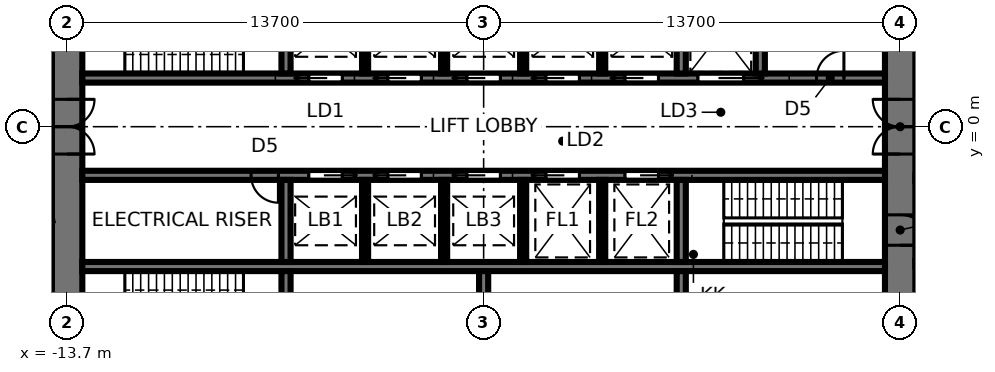
"""IFC4 building model, lengths in metres.
Left out: names, types, materials, properties, quantities, classifications, styles, units other than length and angle.
Written with IfcOpenShell. Run it as: python <this file> out.ifc"""

import sys

from ifc_helpers import new_model, si_unit, direction, frame, frame_2d, origin, place, context, subcontext, project, spatial, rectangle, extrude, element, fill, save


model = new_model("IFC4")
c1 = context("Model", 3, precision=1e-05, world=origin(), true_north=direction((0.0, 1.0)))
c2 = subcontext(c1, "Body", "Model", "MODEL_VIEW")
j1 = project(units=[si_unit("LENGTHUNIT", "METRE"), si_unit("PLANEANGLEUNIT", "RADIAN")], contexts=[c1])
p1 = place(None, origin())
s1 = spatial("IfcSite", under=j1, at=p1, CompositionType="ELEMENT")
p2 = place(p1, origin())
s2 = spatial("IfcBuilding", under=s1, at=p2, CompositionType="ELEMENT")
p3 = place(p2, origin())
s3 = spatial("IfcBuildingStorey", under=s2, at=p3, CompositionType="ELEMENT", Elevation=0.0)
p4 = place(p3, frame((13.7, -9.5, 0.0), z_axis=(0.0, 0.0, 1.0), x_axis=(0.0, 1.0, 0.0)))
e1 = element("IfcWall", 1, at=p4, inside=s3, PredefinedType="SHEAR", context=c2, shape_type="SweptSolid", body=[
    extrude(rectangle(XDim=19.0, YDim=1.0, at=frame_2d((9.5, 0.0))), origin(), (0.0, 0.0, 1.0), 5.6),
])
p5 = place(p4, frame((8.6, 0.0, 0.0)))
e2 = element("IfcOpeningElement", 2, at=p5, cuts=e1, PredefinedType="OPENING", context=c2, shape_type="SweptSolid", body=[
    extrude(rectangle(XDim=1.8, YDim=2.4, at=frame_2d((0.9, 1.2))), frame((0.0, 0.51, 0.0), z_axis=(0.0, -1.0, 0.0), x_axis=(1.0, 0.0, 0.0)), (0.0, 0.0, 1.0), 1.02),
])
p6 = place(p4, frame((5.6, 0.0, 0.0)))
e3 = element("IfcOpeningElement", 3, at=p6, cuts=e1, PredefinedType="OPENING", context=c2, shape_type="SweptSolid", body=[
    extrude(rectangle(XDim=1.0, YDim=2.1, at=frame_2d((0.5, 1.05))), frame((0.0, 0.51, 0.0), z_axis=(0.0, -1.0, 0.0), x_axis=(1.0, 0.0, 0.0)), (0.0, 0.0, 1.0), 1.02),
])
p7 = place(p3, frame((-13.7, 9.5, 0.0), z_axis=(0.0, 0.0, 1.0), x_axis=(0.0, -1.0, 0.0)))
e4 = element("IfcWall", 4, at=p7, inside=s3, PredefinedType="SHEAR", context=c2, shape_type="SweptSolid", body=[
    extrude(rectangle(XDim=19.0, YDim=1.0, at=frame_2d((9.5, 0.0))), origin(), (0.0, 0.0, 1.0), 5.6),
])
p8 = place(p7, frame((8.6, 0.0, 0.0)))
e5 = element("IfcOpeningElement", 5, at=p8, cuts=e4, PredefinedType="OPENING", context=c2, shape_type="SweptSolid", body=[
    extrude(rectangle(XDim=1.8, YDim=2.4, at=frame_2d((0.9, 1.2))), frame((0.0, 0.51, 0.0), z_axis=(0.0, -1.0, 0.0), x_axis=(1.0, 0.0, 0.0)), (0.0, 0.0, 1.0), 1.02),
])
p9 = place(p7, frame((5.3, 0.0, 0.0)))
e6 = element("IfcOpeningElement", 6, at=p9, cuts=e4, PredefinedType="OPENING", context=c2, shape_type="SweptSolid", body=[
    extrude(rectangle(XDim=1.0, YDim=2.1, at=frame_2d((0.5, 1.05))), frame((0.0, 0.51, 0.0), z_axis=(0.0, -1.0, 0.0), x_axis=(1.0, 0.0, 0.0)), (0.0, 0.0, 1.0), 1.02),
])
p10 = place(p3, frame((-13.2, 1.6, 0.0), z_axis=(0.0, 0.0, 1.0), x_axis=(1.0, 0.0, 0.0)))
e7 = element("IfcWall", 7, at=p10, inside=s3, PredefinedType="SHEAR", context=c2, shape_type="SweptSolid", body=[
    extrude(rectangle(XDim=26.4, YDim=0.3, at=frame_2d((13.2, 0.0))), origin(), (0.0, 0.0, 1.0), 5.6),
])
p11 = place(p10, frame((20.25, 0.0, 0.0)))
e8 = element("IfcOpeningElement", 8, at=p11, cuts=e7, PredefinedType="OPENING", context=c2, shape_type="SweptSolid", body=[
    extrude(rectangle(XDim=1.5, YDim=2.4, at=frame_2d((0.75, 1.2))), frame((0.0, 0.16, 0.0), z_axis=(0.0, -1.0, 0.0), x_axis=(1.0, 0.0, 0.0)), (0.0, 0.0, 1.0), 0.32),
])
p12 = place(p10, frame((7.45, 0.0, 0.0)))
e9 = element("IfcOpeningElement", 9, at=p12, cuts=e7, PredefinedType="OPENING", context=c2, shape_type="SweptSolid", body=[
    extrude(rectangle(XDim=1.1, YDim=2.3, at=frame_2d((0.55, 1.15))), frame((0.0, 0.16, 0.0), z_axis=(0.0, -1.0, 0.0), x_axis=(1.0, 0.0, 0.0)), (0.0, 0.0, 1.0), 0.32),
])
p13 = place(p10, frame((10.05, 0.0, 0.0)))
e10 = element("IfcOpeningElement", 10, at=p13, cuts=e7, PredefinedType="OPENING", context=c2, shape_type="SweptSolid", body=[
    extrude(rectangle(XDim=1.1, YDim=2.3, at=frame_2d((0.55, 1.15))), frame((0.0, 0.16, 0.0), z_axis=(0.0, -1.0, 0.0), x_axis=(1.0, 0.0, 0.0)), (0.0, 0.0, 1.0), 0.32),
])
p14 = place(p10, frame((12.65, 0.0, 0.0)))
e11 = element("IfcOpeningElement", 11, at=p14, cuts=e7, PredefinedType="OPENING", context=c2, shape_type="SweptSolid", body=[
    extrude(rectangle(XDim=1.1, YDim=2.3, at=frame_2d((0.55, 1.15))), frame((0.0, 0.16, 0.0), z_axis=(0.0, -1.0, 0.0), x_axis=(1.0, 0.0, 0.0)), (0.0, 0.0, 1.0), 0.32),
])
p15 = place(p10, frame((15.25, 0.0, 0.0)))
e12 = element("IfcOpeningElement", 12, at=p15, cuts=e7, PredefinedType="OPENING", context=c2, shape_type="SweptSolid", body=[
    extrude(rectangle(XDim=1.1, YDim=2.3, at=frame_2d((0.55, 1.15))), frame((0.0, 0.16, 0.0), z_axis=(0.0, -1.0, 0.0), x_axis=(1.0, 0.0, 0.0)), (0.0, 0.0, 1.0), 0.32),
])
p16 = place(p10, frame((17.85, 0.0, 0.0)))
e13 = element("IfcOpeningElement", 13, at=p16, cuts=e7, PredefinedType="OPENING", context=c2, shape_type="SweptSolid", body=[
    extrude(rectangle(XDim=1.1, YDim=2.3, at=frame_2d((0.55, 1.15))), frame((0.0, 0.16, 0.0), z_axis=(0.0, -1.0, 0.0), x_axis=(1.0, 0.0, 0.0)), (0.0, 0.0, 1.0), 0.32),
])
p17 = place(p10, frame((24.15, 0.0, 0.0)))
e14 = element("IfcOpeningElement", 14, at=p17, cuts=e7, PredefinedType="OPENING", context=c2, shape_type="SweptSolid", body=[
    extrude(rectangle(XDim=0.9, YDim=2.1, at=frame_2d((0.45, 1.05))), frame((0.0, 0.16, 0.0), z_axis=(0.0, -1.0, 0.0), x_axis=(1.0, 0.0, 0.0)), (0.0, 0.0, 1.0), 0.32),
])
p18 = place(p3, frame((-13.2, -1.6, 0.0), z_axis=(0.0, 0.0, 1.0), x_axis=(1.0, 0.0, 0.0)))
e15 = element("IfcWall", 15, at=p18, inside=s3, PredefinedType="SHEAR", context=c2, shape_type="SweptSolid", body=[
    extrude(rectangle(XDim=26.4, YDim=0.3, at=frame_2d((13.2, 0.0))), origin(), (0.0, 0.0, 1.0), 5.6),
])
p19 = place(p18, frame((7.45, 0.0, 0.0)))
e16 = element("IfcOpeningElement", 16, at=p19, cuts=e15, PredefinedType="OPENING", context=c2, shape_type="SweptSolid", body=[
    extrude(rectangle(XDim=1.1, YDim=2.3, at=frame_2d((0.55, 1.15))), frame((0.0, 0.16, 0.0), z_axis=(0.0, -1.0, 0.0), x_axis=(1.0, 0.0, 0.0)), (0.0, 0.0, 1.0), 0.32),
])
p20 = place(p18, frame((10.05, 0.0, 0.0)))
e17 = element("IfcOpeningElement", 17, at=p20, cuts=e15, PredefinedType="OPENING", context=c2, shape_type="SweptSolid", body=[
    extrude(rectangle(XDim=1.1, YDim=2.3, at=frame_2d((0.55, 1.15))), frame((0.0, 0.16, 0.0), z_axis=(0.0, -1.0, 0.0), x_axis=(1.0, 0.0, 0.0)), (0.0, 0.0, 1.0), 0.32),
])
p21 = place(p18, frame((12.65, 0.0, 0.0)))
e18 = element("IfcOpeningElement", 18, at=p21, cuts=e15, PredefinedType="OPENING", context=c2, shape_type="SweptSolid", body=[
    extrude(rectangle(XDim=1.1, YDim=2.3, at=frame_2d((0.55, 1.15))), frame((0.0, 0.16, 0.0), z_axis=(0.0, -1.0, 0.0), x_axis=(1.0, 0.0, 0.0)), (0.0, 0.0, 1.0), 0.32),
])
p22 = place(p18, frame((15.25, 0.0, 0.0)))
e19 = element("IfcOpeningElement", 19, at=p22, cuts=e15, PredefinedType="OPENING", context=c2, shape_type="SweptSolid", body=[
    extrude(rectangle(XDim=1.1, YDim=2.3, at=frame_2d((0.55, 1.15))), frame((0.0, 0.16, 0.0), z_axis=(0.0, -1.0, 0.0), x_axis=(1.0, 0.0, 0.0)), (0.0, 0.0, 1.0), 0.32),
])
p23 = place(p18, frame((17.85, 0.0, 0.0)))
e20 = element("IfcOpeningElement", 20, at=p23, cuts=e15, PredefinedType="OPENING", context=c2, shape_type="SweptSolid", body=[
    extrude(rectangle(XDim=1.1, YDim=2.3, at=frame_2d((0.55, 1.15))), frame((0.0, 0.16, 0.0), z_axis=(0.0, -1.0, 0.0), x_axis=(1.0, 0.0, 0.0)), (0.0, 0.0, 1.0), 0.32),
])
p24 = place(p18, frame((5.55, 0.0, 0.0)))
e21 = element("IfcOpeningElement", 21, at=p24, cuts=e15, PredefinedType="OPENING", context=c2, shape_type="SweptSolid", body=[
    extrude(rectangle(XDim=0.9, YDim=2.1, at=frame_2d((0.45, 1.05))), frame((0.0, 0.16, 0.0), z_axis=(0.0, -1.0, 0.0), x_axis=(1.0, 0.0, 0.0)), (0.0, 0.0, 1.0), 0.32),
])
p25 = place(p3, frame((-13.2, -4.6, 0.0), z_axis=(0.0, 0.0, 1.0), x_axis=(1.0, 0.0, 0.0)))
e22 = element("IfcWall", 22, at=p25, inside=s3, PredefinedType="SHEAR", context=c2, shape_type="SweptSolid", body=[
    extrude(rectangle(XDim=26.4, YDim=0.3, at=frame_2d((13.2, 0.0))), origin(), (0.0, 0.0, 1.0), 5.6),
])
for number, where, z_axis, x_axis in (
    (23, (-6.5, 1.75, 0.0), (0.0, 0.0, 1.0), (0.0, 1.0, 0.0)),
    (24, (6.5, 1.75, 0.0), (0.0, 0.0, 1.0), (0.0, 1.0, 0.0)),
):
    element("IfcWall", number, at=place(p3, frame(where, z_axis=z_axis, x_axis=x_axis)), inside=s3, PredefinedType="SHEAR", context=c2, shape_type="SweptSolid", body=[
        extrude(rectangle(XDim=2.7, YDim=0.3, at=frame_2d((1.35, 0.0))), origin(), (0.0, 0.0, 1.0), 5.6),
    ])
for number, where, z_axis, x_axis in (
    (25, (-3.9, 1.75, 0.0), (0.0, 0.0, 1.0), (0.0, 1.0, 0.0)),
    (26, (-1.3, 1.75, 0.0), (0.0, 0.0, 1.0), (0.0, 1.0, 0.0)),
    (27, (1.3, 1.75, 0.0), (0.0, 0.0, 1.0), (0.0, 1.0, 0.0)),
    (28, (3.9, 1.75, 0.0), (0.0, 0.0, 1.0), (0.0, 1.0, 0.0)),
):
    element("IfcWall", number, at=place(p3, frame(where, z_axis=z_axis, x_axis=x_axis)), inside=s3, PredefinedType="SHEAR", context=c2, shape_type="SweptSolid", body=[
        extrude(rectangle(XDim=2.7, YDim=0.2, at=frame_2d((1.35, 0.0))), origin(), (0.0, 0.0, 1.0), 5.6),
    ])
p26 = place(p3, frame((-6.5, -1.75, 0.0), z_axis=(0.0, 0.0, 1.0), x_axis=(0.0, -1.0, 0.0)))
e29 = element("IfcWall", 29, at=p26, inside=s3, PredefinedType="SHEAR", context=c2, shape_type="SweptSolid", body=[
    extrude(rectangle(XDim=2.7, YDim=0.3, at=frame_2d((1.35, 0.0))), origin(), (0.0, 0.0, 1.0), 5.6),
])
p27 = place(p3, frame((-6.5, -4.75, 0.0), z_axis=(0.0, 0.0, 1.0), x_axis=(0.0, -1.0, 0.0)))
e30 = element("IfcWall", 30, at=p27, inside=s3, PredefinedType="SHEAR", context=c2, shape_type="SweptSolid", body=[
    extrude(rectangle(XDim=3.75, YDim=0.3, at=frame_2d((1.875, 0.0))), origin(), (0.0, 0.0, 1.0), 5.6),
])
p28 = place(p3, frame((6.5, -1.75, 0.0), z_axis=(0.0, 0.0, 1.0), x_axis=(0.0, -1.0, 0.0)))
e31 = element("IfcWall", 31, at=p28, inside=s3, PredefinedType="SHEAR", context=c2, shape_type="SweptSolid", body=[
    extrude(rectangle(XDim=2.7, YDim=0.3, at=frame_2d((1.35, 0.0))), origin(), (0.0, 0.0, 1.0), 5.6),
])
p29 = place(p3, frame((6.5, -4.75, 0.0), z_axis=(0.0, 0.0, 1.0), x_axis=(0.0, -1.0, 0.0)))
e32 = element("IfcWall", 32, at=p29, inside=s3, PredefinedType="SHEAR", context=c2, shape_type="SweptSolid", body=[
    extrude(rectangle(XDim=3.75, YDim=0.3, at=frame_2d((1.875, 0.0))), origin(), (0.0, 0.0, 1.0), 5.6),
])
for number, where, z_axis, x_axis in (
    (33, (-3.9, -1.75, 0.0), (0.0, 0.0, 1.0), (0.0, -1.0, 0.0)),
    (34, (-1.3, -1.75, 0.0), (0.0, 0.0, 1.0), (0.0, -1.0, 0.0)),
    (35, (1.3, -1.75, 0.0), (0.0, 0.0, 1.0), (0.0, -1.0, 0.0)),
    (36, (3.9, -1.75, 0.0), (0.0, 0.0, 1.0), (0.0, -1.0, 0.0)),
):
    element("IfcWall", number, at=place(p3, frame(where, z_axis=z_axis, x_axis=x_axis)), inside=s3, PredefinedType="SHEAR", context=c2, shape_type="SweptSolid", body=[
        extrude(rectangle(XDim=2.7, YDim=0.2, at=frame_2d((1.35, 0.0))), origin(), (0.0, 0.0, 1.0), 5.6),
    ])
p30 = place(p3, frame((0.0, -4.75, 0.0), z_axis=(0.0, 0.0, 1.0), x_axis=(0.0, -1.0, 0.0)))
e37 = element("IfcWall", 37, at=p30, inside=s3, PredefinedType="SHEAR", context=c2, shape_type="SweptSolid", body=[
    extrude(rectangle(XDim=3.75, YDim=0.3, at=frame_2d((1.875, 0.0))), origin(), (0.0, 0.0, 1.0), 5.6),
])
p31 = place(p3, frame((9.1, 1.75, 0.0), z_axis=(0.0, 0.0, 1.0), x_axis=(0.0, 1.0, 0.0)))
e38 = element("IfcWall", 38, at=p31, inside=s3, PredefinedType="SHEAR", context=c2, shape_type="SweptSolid", body=[
    extrude(rectangle(XDim=2.7, YDim=0.3, at=frame_2d((1.35, 0.0))), origin(), (0.0, 0.0, 1.0), 5.6),
])
p32 = place(p3, frame((-14.2, -3.018, 0.0), z_axis=(0.0, 0.0, 1.0), x_axis=(-0.978147950805, -0.207910043854, 0.0)))
e39 = element("IfcWall", 39, at=p32, inside=s3, PredefinedType="PARTITIONING", context=c2, shape_type="SweptSolid", body=[
    extrude(rectangle(XDim=11.443, YDim=0.15, at=frame_2d((5.722, 0.0))), origin(), (0.0, 0.0, 1.0), 5.4),
])
p33 = place(p32, frame((4.118, 0.0, 0.0)))
e40 = element("IfcOpeningElement", 40, at=p33, cuts=e39, PredefinedType="OPENING", context=c2, shape_type="SweptSolid", body=[
    extrude(rectangle(XDim=1.8, YDim=2.4, at=frame_2d((0.9, 1.2))), frame((0.0, 0.085, 0.0), z_axis=(0.0, -1.0, 0.0), x_axis=(1.0, 0.0, 0.0)), (0.0, 0.0, 1.0), 0.17),
])
p34 = place(p3, frame((14.2, -4.5, 0.0), z_axis=(0.0, 0.0, 1.0), x_axis=(1.0, 0.0, 0.0)))
e41 = element("IfcWall", 41, at=p34, inside=s3, PredefinedType="SOLIDWALL", context=c2, shape_type="SweptSolid", body=[
    extrude(rectangle(XDim=3.8, YDim=0.19, at=frame_2d((1.9, 0.0))), origin(), (0.0, 0.0, 1.0), 5.4),
])
p35 = place(p34, frame((0.4, 0.0, 0.0)))
e42 = element("IfcOpeningElement", 42, at=p35, cuts=e41, PredefinedType="OPENING", context=c2, shape_type="SweptSolid", body=[
    extrude(rectangle(XDim=1.0, YDim=2.1, at=frame_2d((0.5, 1.05))), frame((0.0, 0.105, 0.0), z_axis=(0.0, -1.0, 0.0), x_axis=(1.0, 0.0, 0.0)), (0.0, 0.0, 1.0), 0.21),
])
p36 = place(p8, origin())
e43 = element("IfcDoor", 43, at=p36, inside=s3, OperationType="DOUBLE_DOOR_SINGLE_SWING", PredefinedType="DOOR", context=c2, shape_type="SweptSolid", body=[
    extrude(rectangle(XDim=1.72, YDim=2.36, at=frame_2d((0.9, 1.18))), frame((0.0, 0.025, 0.0), z_axis=(0.0, -1.0, 0.0), x_axis=(1.0, 0.0, 0.0)), (0.0, 0.0, 1.0), 0.05),
    extrude(rectangle(XDim=0.04, YDim=2.4, at=frame_2d((0.02, 1.2))), frame((0.0, 0.25, 0.0), z_axis=(0.0, -1.0, 0.0), x_axis=(1.0, 0.0, 0.0)), (0.0, 0.0, 1.0), 0.5),
    extrude(rectangle(XDim=0.04, YDim=2.4, at=frame_2d((1.78, 1.2))), frame((0.0, 0.25, 0.0), z_axis=(0.0, -1.0, 0.0), x_axis=(1.0, 0.0, 0.0)), (0.0, 0.0, 1.0), 0.5),
    extrude(rectangle(XDim=1.72, YDim=0.04, at=frame_2d((0.9, 2.38))), frame((0.0, 0.25, 0.0), z_axis=(0.0, -1.0, 0.0), x_axis=(1.0, 0.0, 0.0)), (0.0, 0.0, 1.0), 0.5),
])
fill(e5, e43)
p37 = place(p5, origin())
e44 = element("IfcDoor", 44, at=p37, inside=s3, OperationType="DOUBLE_DOOR_SINGLE_SWING", PredefinedType="DOOR", context=c2, shape_type="SweptSolid", body=[
    extrude(rectangle(XDim=1.72, YDim=2.36, at=frame_2d((0.9, 1.18))), frame((0.0, 0.025, 0.0), z_axis=(0.0, -1.0, 0.0), x_axis=(1.0, 0.0, 0.0)), (0.0, 0.0, 1.0), 0.05),
    extrude(rectangle(XDim=0.04, YDim=2.4, at=frame_2d((0.02, 1.2))), frame((0.0, 0.25, 0.0), z_axis=(0.0, -1.0, 0.0), x_axis=(1.0, 0.0, 0.0)), (0.0, 0.0, 1.0), 0.5),
    extrude(rectangle(XDim=0.04, YDim=2.4, at=frame_2d((1.78, 1.2))), frame((0.0, 0.25, 0.0), z_axis=(0.0, -1.0, 0.0), x_axis=(1.0, 0.0, 0.0)), (0.0, 0.0, 1.0), 0.5),
    extrude(rectangle(XDim=1.72, YDim=0.04, at=frame_2d((0.9, 2.38))), frame((0.0, 0.25, 0.0), z_axis=(0.0, -1.0, 0.0), x_axis=(1.0, 0.0, 0.0)), (0.0, 0.0, 1.0), 0.5),
])
fill(e2, e44)
p38 = place(p6, frame((1.0, 0.0, 0.0), z_axis=(0.0, 0.0, 1.0), x_axis=(-1.0, 0.0, 0.0)))
e45 = element("IfcDoor", 45, at=p38, inside=s3, OperationType="SINGLE_SWING_RIGHT", PredefinedType="DOOR", context=c2, shape_type="SweptSolid", body=[
    extrude(rectangle(XDim=0.92, YDim=2.06, at=frame_2d((0.5, 1.03))), frame((0.0, 0.025, 0.0), z_axis=(0.0, -1.0, 0.0), x_axis=(1.0, 0.0, 0.0)), (0.0, 0.0, 1.0), 0.05),
    extrude(rectangle(XDim=0.04, YDim=2.1, at=frame_2d((0.98, 1.05))), frame((0.0, 0.25, 0.0), z_axis=(0.0, -1.0, 0.0), x_axis=(1.0, 0.0, 0.0)), (0.0, 0.0, 1.0), 0.5),
    extrude(rectangle(XDim=0.04, YDim=2.1, at=frame_2d((0.02, 1.05))), frame((0.0, 0.25, 0.0), z_axis=(0.0, -1.0, 0.0), x_axis=(1.0, 0.0, 0.0)), (0.0, 0.0, 1.0), 0.5),
    extrude(rectangle(XDim=0.92, YDim=0.04, at=frame_2d((0.5, 2.08))), frame((0.0, 0.25, 0.0), z_axis=(0.0, -1.0, 0.0), x_axis=(1.0, 0.0, 0.0)), (0.0, 0.0, 1.0), 0.5),
])
fill(e3, e45)
p39 = place(p11, origin())
e46 = element("IfcDoor", 46, at=p39, inside=s3, OperationType="SLIDING_TO_RIGHT", PredefinedType="DOOR", context=c2, shape_type="SweptSolid", body=[
    extrude(rectangle(XDim=1.5, YDim=2.4, at=frame_2d((0.75, 1.2))), frame((0.0, 0.025, 0.0), z_axis=(0.0, -1.0, 0.0), x_axis=(1.0, 0.0, 0.0)), (0.0, 0.0, 1.0), 0.05),
])
fill(e8, e46)
p40 = place(p12, origin())
e47 = element("IfcDoor", 47, at=p40, inside=s3, OperationType="SLIDING_TO_LEFT", PredefinedType="DOOR", context=c2, shape_type="SweptSolid", body=[
    extrude(rectangle(XDim=1.1, YDim=2.3, at=frame_2d((0.55, 1.15))), frame((0.0, 0.025, 0.0), z_axis=(0.0, -1.0, 0.0), x_axis=(1.0, 0.0, 0.0)), (0.0, 0.0, 1.0), 0.05),
])
fill(e9, e47)
p41 = place(p13, origin())
e48 = element("IfcDoor", 48, at=p41, inside=s3, OperationType="SLIDING_TO_LEFT", PredefinedType="DOOR", context=c2, shape_type="SweptSolid", body=[
    extrude(rectangle(XDim=1.1, YDim=2.3, at=frame_2d((0.55, 1.15))), frame((0.0, 0.025, 0.0), z_axis=(0.0, -1.0, 0.0), x_axis=(1.0, 0.0, 0.0)), (0.0, 0.0, 1.0), 0.05),
])
fill(e10, e48)
p42 = place(p14, origin())
e49 = element("IfcDoor", 49, at=p42, inside=s3, OperationType="SLIDING_TO_LEFT", PredefinedType="DOOR", context=c2, shape_type="SweptSolid", body=[
    extrude(rectangle(XDim=1.1, YDim=2.3, at=frame_2d((0.55, 1.15))), frame((0.0, 0.025, 0.0), z_axis=(0.0, -1.0, 0.0), x_axis=(1.0, 0.0, 0.0)), (0.0, 0.0, 1.0), 0.05),
])
fill(e11, e49)
p43 = place(p15, origin())
e50 = element("IfcDoor", 50, at=p43, inside=s3, OperationType="SLIDING_TO_LEFT", PredefinedType="DOOR", context=c2, shape_type="SweptSolid", body=[
    extrude(rectangle(XDim=1.1, YDim=2.3, at=frame_2d((0.55, 1.15))), frame((0.0, 0.025, 0.0), z_axis=(0.0, -1.0, 0.0), x_axis=(1.0, 0.0, 0.0)), (0.0, 0.0, 1.0), 0.05),
])
fill(e12, e50)
p44 = place(p16, origin())
e51 = element("IfcDoor", 51, at=p44, inside=s3, OperationType="SLIDING_TO_LEFT", PredefinedType="DOOR", context=c2, shape_type="SweptSolid", body=[
    extrude(rectangle(XDim=1.1, YDim=2.3, at=frame_2d((0.55, 1.15))), frame((0.0, 0.025, 0.0), z_axis=(0.0, -1.0, 0.0), x_axis=(1.0, 0.0, 0.0)), (0.0, 0.0, 1.0), 0.05),
])
fill(e13, e51)
p45 = place(p19, frame((1.1, 0.0, 0.0), z_axis=(0.0, 0.0, 1.0), x_axis=(-1.0, 0.0, 0.0)))
e52 = element("IfcDoor", 52, at=p45, inside=s3, OperationType="SLIDING_TO_LEFT", PredefinedType="DOOR", context=c2, shape_type="SweptSolid", body=[
    extrude(rectangle(XDim=1.1, YDim=2.3, at=frame_2d((0.55, 1.15))), frame((0.0, 0.025, 0.0), z_axis=(0.0, -1.0, 0.0), x_axis=(1.0, 0.0, 0.0)), (0.0, 0.0, 1.0), 0.05),
])
fill(e16, e52)
p46 = place(p20, frame((1.1, 0.0, 0.0), z_axis=(0.0, 0.0, 1.0), x_axis=(-1.0, 0.0, 0.0)))
e53 = element("IfcDoor", 53, at=p46, inside=s3, OperationType="SLIDING_TO_RIGHT", PredefinedType="DOOR", context=c2, shape_type="SweptSolid", body=[
    extrude(rectangle(XDim=1.1, YDim=2.3, at=frame_2d((0.55, 1.15))), frame((0.0, 0.025, 0.0), z_axis=(0.0, -1.0, 0.0), x_axis=(1.0, 0.0, 0.0)), (0.0, 0.0, 1.0), 0.05),
])
fill(e17, e53)
p47 = place(p21, frame((1.1, 0.0, 0.0), z_axis=(0.0, 0.0, 1.0), x_axis=(-1.0, 0.0, 0.0)))
e54 = element("IfcDoor", 54, at=p47, inside=s3, OperationType="SLIDING_TO_RIGHT", PredefinedType="DOOR", context=c2, shape_type="SweptSolid", body=[
    extrude(rectangle(XDim=1.1, YDim=2.3, at=frame_2d((0.55, 1.15))), frame((0.0, 0.025, 0.0), z_axis=(0.0, -1.0, 0.0), x_axis=(1.0, 0.0, 0.0)), (0.0, 0.0, 1.0), 0.05),
])
fill(e18, e54)
p48 = place(p22, frame((1.1, 0.0, 0.0), z_axis=(0.0, 0.0, 1.0), x_axis=(-1.0, 0.0, 0.0)))
e55 = element("IfcDoor", 55, at=p48, inside=s3, OperationType="SLIDING_TO_RIGHT", PredefinedType="DOOR", context=c2, shape_type="SweptSolid", body=[
    extrude(rectangle(XDim=1.1, YDim=2.3, at=frame_2d((0.55, 1.15))), frame((0.0, 0.025, 0.0), z_axis=(0.0, -1.0, 0.0), x_axis=(1.0, 0.0, 0.0)), (0.0, 0.0, 1.0), 0.05),
])
fill(e19, e55)
p49 = place(p23, frame((1.1, 0.0, 0.0), z_axis=(0.0, 0.0, 1.0), x_axis=(-1.0, 0.0, 0.0)))
e56 = element("IfcDoor", 56, at=p49, inside=s3, OperationType="SLIDING_TO_LEFT", PredefinedType="DOOR", context=c2, shape_type="SweptSolid", body=[
    extrude(rectangle(XDim=1.1, YDim=2.3, at=frame_2d((0.55, 1.15))), frame((0.0, 0.025, 0.0), z_axis=(0.0, -1.0, 0.0), x_axis=(1.0, 0.0, 0.0)), (0.0, 0.0, 1.0), 0.05),
])
fill(e20, e56)
p50 = place(p17, origin())
e57 = element("IfcDoor", 57, at=p50, inside=s3, OperationType="SINGLE_SWING_RIGHT", PredefinedType="DOOR", context=c2, shape_type="SweptSolid", body=[
    extrude(rectangle(XDim=0.9, YDim=2.1, at=frame_2d((0.45, 1.05))), frame((0.0, 0.025, 0.0), z_axis=(0.0, -1.0, 0.0), x_axis=(1.0, 0.0, 0.0)), (0.0, 0.0, 1.0), 0.05),
])
fill(e14, e57)
p51 = place(p24, frame((0.9, 0.0, 0.0), z_axis=(0.0, 0.0, 1.0), x_axis=(-1.0, 0.0, 0.0)))
e58 = element("IfcDoor", 58, at=p51, inside=s3, OperationType="SINGLE_SWING_LEFT", PredefinedType="DOOR", context=c2, shape_type="SweptSolid", body=[
    extrude(rectangle(XDim=0.9, YDim=2.1, at=frame_2d((0.45, 1.05))), frame((0.0, 0.025, 0.0), z_axis=(0.0, -1.0, 0.0), x_axis=(1.0, 0.0, 0.0)), (0.0, 0.0, 1.0), 0.05),
])
fill(e21, e58)
save(model, sys.argv[1])
